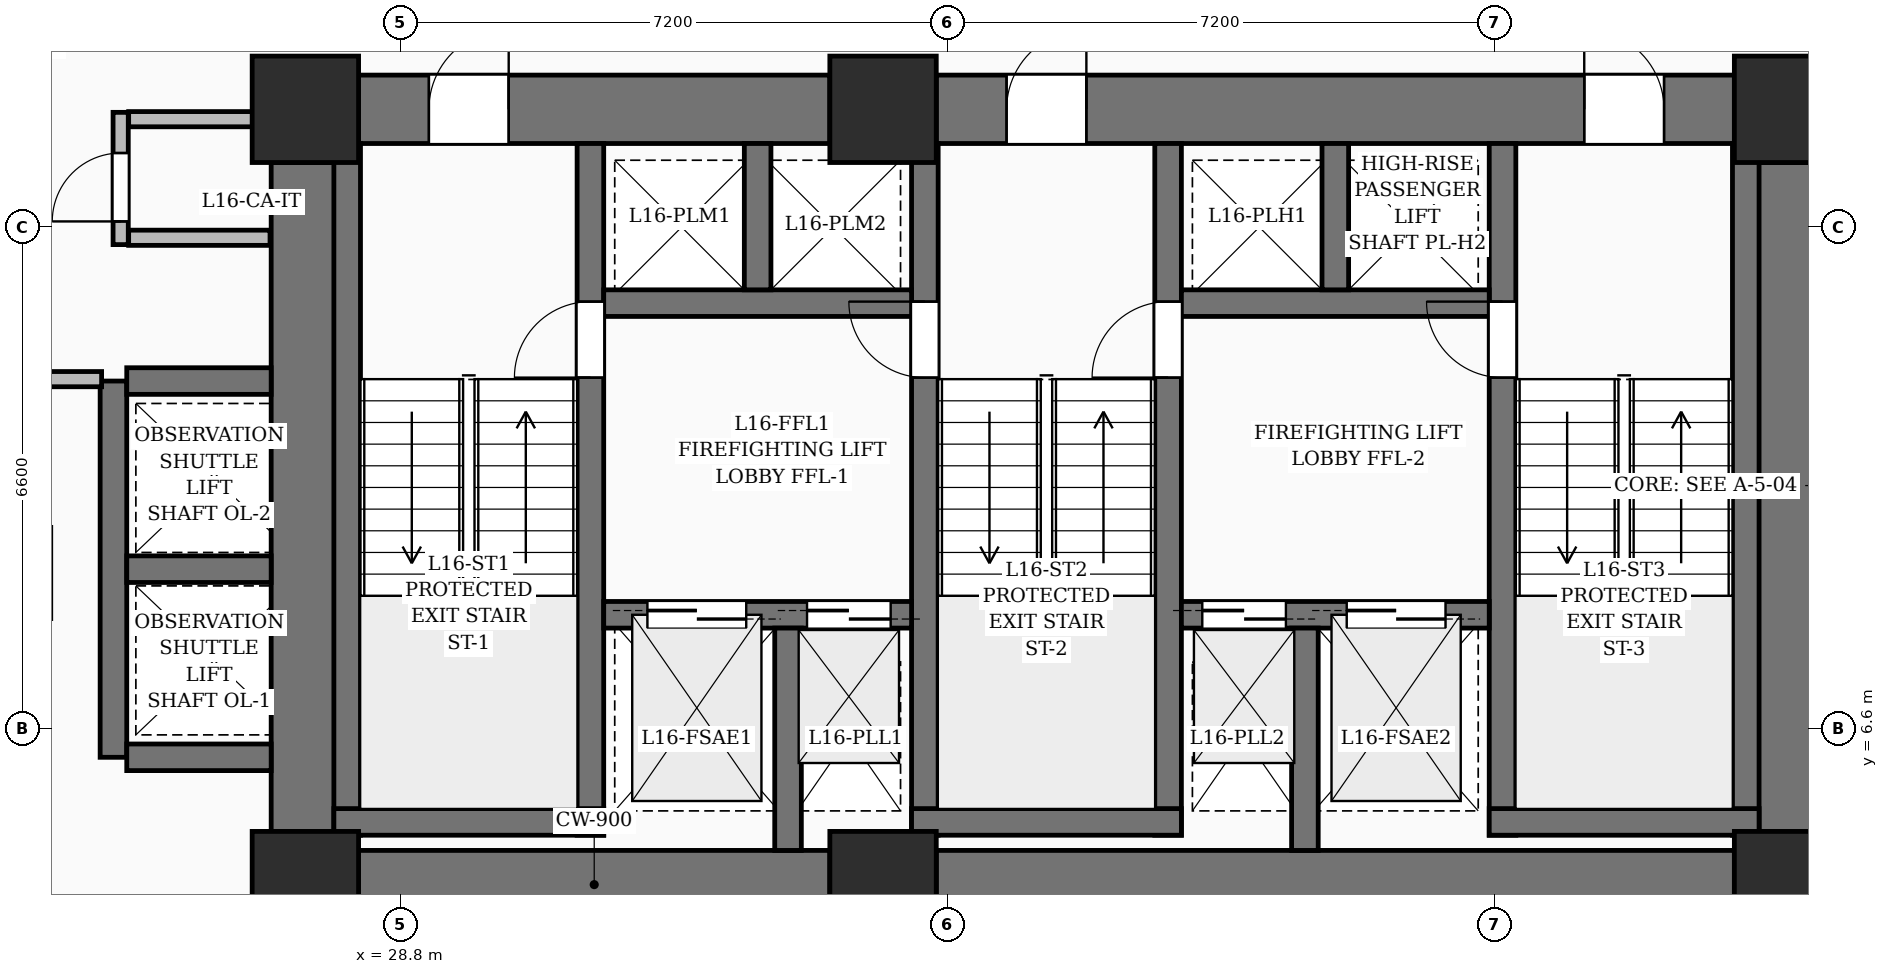
"""IFC4 building model, lengths in metres.
Left out: names, types, materials, properties, quantities, classifications, styles, units other than length and angle.
Written with IfcOpenShell. Run it as: python <this file> out.ifc"""

import sys

from ifc_helpers import new_model, si_unit, direction, frame, frame_2d, origin, origin_2d, place, context, subcontext, project, spatial, rectangle, extrude, element, fill, save


model = new_model("IFC4")
c1 = context("Model", 3, precision=1e-05, world=origin(), true_north=direction((0.0, 1.0)))
c2 = subcontext(c1, "Body", "Model", "MODEL_VIEW")
j1 = project(units=[si_unit("LENGTHUNIT", "METRE"), si_unit("PLANEANGLEUNIT", "RADIAN")], contexts=[c1])
p1 = place(None, origin())
s1 = spatial("IfcSite", under=j1, at=p1, CompositionType="ELEMENT")
p2 = place(p1, origin())
s2 = spatial("IfcBuilding", under=s1, at=p2, CompositionType="ELEMENT")
p3 = place(p2, frame((0.0, 0.0, 67.8)))
s3 = spatial("IfcBuildingStorey", under=s2, at=p3, CompositionType="ELEMENT", Elevation=67.8)
for number, where, z_axis, x_axis in (
    (1, (27.55, 4.55, 0.0), (0.0, 0.0, 1.0), (1.0, 0.0, 0.0)),
    (2, (35.15, 4.55, 0.0), (0.0, 0.0, 1.0), (1.0, 0.0, 0.0)),
    (3, (47.05, 4.55, 0.0), (0.0, 0.0, 1.0), (1.0, 0.0, 0.0)),
    (4, (27.55, 14.75, 0.0), (0.0, 0.0, 1.0), (1.0, 0.0, 0.0)),
    (5, (35.15, 14.75, 0.0), (0.0, 0.0, 1.0), (1.0, 0.0, 0.0)),
    (6, (47.05, 14.75, 0.0), (0.0, 0.0, 1.0), (1.0, 0.0, 0.0)),
):
    element("IfcColumn", number, at=place(p3, frame(where, z_axis=z_axis, x_axis=x_axis)), inside=s3, PredefinedType="COLUMN", context=c2, shape_type="SweptSolid", body=[
        extrude(rectangle(XDim=1.4, YDim=1.4, at=origin_2d()), origin(), (0.0, 0.0, 1.0), 3.6),
    ])
p4 = place(p3, frame((28.25, 4.55, 0.0), z_axis=(0.0, 0.0, 1.0), x_axis=(1.0, 0.0, 0.0)))
e7 = element("IfcWall", 7, at=p4, inside=s3, PredefinedType="SHEAR", context=c2, shape_type="SweptSolid", body=[
    extrude(rectangle(XDim=6.2, YDim=0.9, at=frame_2d((3.1, 0.0))), origin(), (0.0, 0.0, 1.0), 3.6),
])
p5 = place(p3, frame((35.85, 4.55, 0.0), z_axis=(0.0, 0.0, 1.0), x_axis=(1.0, 0.0, 0.0)))
e8 = element("IfcWall", 8, at=p5, inside=s3, PredefinedType="SHEAR", context=c2, shape_type="SweptSolid", body=[
    extrude(rectangle(XDim=10.5, YDim=0.9, at=frame_2d((5.25, 0.0))), origin(), (0.0, 0.0, 1.0), 3.6),
])
p6 = place(p3, frame((28.25, 14.75, 0.0), z_axis=(0.0, 0.0, 1.0), x_axis=(1.0, 0.0, 0.0)))
e9 = element("IfcWall", 9, at=p6, inside=s3, PredefinedType="SHEAR", context=c2, shape_type="SweptSolid", body=[
    extrude(rectangle(XDim=6.2, YDim=0.9, at=frame_2d((3.1, 0.0))), origin(), (0.0, 0.0, 1.0), 3.6),
])
p7 = place(p6, frame((0.925, 0.0, 0.0)))
e10 = element("IfcOpeningElement", 10, at=p7, cuts=e9, PredefinedType="OPENING", context=c2, shape_type="SweptSolid", body=[
    extrude(rectangle(XDim=1.05, YDim=2.15, at=frame_2d((0.525, 1.075))), frame((0.0, 0.46, 0.0), z_axis=(0.0, -1.0, 0.0), x_axis=(1.0, 0.0, 0.0)), (0.0, 0.0, 1.0), 0.92),
])
p8 = place(p3, frame((35.85, 14.75, 0.0), z_axis=(0.0, 0.0, 1.0), x_axis=(1.0, 0.0, 0.0)))
e11 = element("IfcWall", 11, at=p8, inside=s3, PredefinedType="SHEAR", context=c2, shape_type="SweptSolid", body=[
    extrude(rectangle(XDim=10.5, YDim=0.9, at=frame_2d((5.25, 0.0))), origin(), (0.0, 0.0, 1.0), 3.6),
])
p9 = place(p8, frame((0.925, 0.0, 0.0)))
e12 = element("IfcOpeningElement", 12, at=p9, cuts=e11, PredefinedType="OPENING", context=c2, shape_type="SweptSolid", body=[
    extrude(rectangle(XDim=1.05, YDim=2.15, at=frame_2d((0.525, 1.075))), frame((0.0, 0.46, 0.0), z_axis=(0.0, -1.0, 0.0), x_axis=(1.0, 0.0, 0.0)), (0.0, 0.0, 1.0), 0.92),
])
p10 = place(p8, frame((8.525, 0.0, 0.0)))
e13 = element("IfcOpeningElement", 13, at=p10, cuts=e11, PredefinedType="OPENING", context=c2, shape_type="SweptSolid", body=[
    extrude(rectangle(XDim=1.05, YDim=2.15, at=frame_2d((0.525, 1.075))), frame((0.0, 0.46, 0.0), z_axis=(0.0, -1.0, 0.0), x_axis=(1.0, 0.0, 0.0)), (0.0, 0.0, 1.0), 0.92),
])
for number, where, z_axis, x_axis in (
    (14, (27.55, 5.25, 0.0), (0.0, 0.0, 1.0), (0.0, 1.0, 0.0)),
    (15, (47.05, 5.25, 0.0), (0.0, 0.0, 1.0), (0.0, 1.0, 0.0)),
):
    element("IfcWall", number, at=place(p3, frame(where, z_axis=z_axis, x_axis=x_axis)), inside=s3, PredefinedType="SHEAR", context=c2, shape_type="SweptSolid", body=[
        extrude(rectangle(XDim=8.8, YDim=0.9, at=frame_2d((4.4, 0.0))), origin(), (0.0, 0.0, 1.0), 3.6),
    ])
p11 = place(p3, frame((28.1, 5.2, 0.0), z_axis=(0.0, 0.0, 1.0), x_axis=(0.0, 1.0, 0.0)))
e16 = element("IfcWall", 16, at=p11, inside=s3, PredefinedType="SOLIDWALL", context=c2, shape_type="SweptSolid", body=[
    extrude(rectangle(XDim=9.1, YDim=0.35, at=frame_2d((4.55, 0.0))), origin(), (0.0, 0.0, 1.0), 3.6),
])
p12 = place(p3, frame((31.3, 5.2, 0.0), z_axis=(0.0, 0.0, 1.0), x_axis=(0.0, 1.0, 0.0)))
e17 = element("IfcWall", 17, at=p12, inside=s3, PredefinedType="SOLIDWALL", context=c2, shape_type="SweptSolid", body=[
    extrude(rectangle(XDim=9.1, YDim=0.35, at=frame_2d((4.55, 0.0))), origin(), (0.0, 0.0, 1.0), 3.6),
])
p13 = place(p12, frame((6.02, 0.0, 0.0)))
e18 = element("IfcOpeningElement", 18, at=p13, cuts=e17, PredefinedType="OPENING", context=c2, shape_type="SweptSolid", body=[
    extrude(rectangle(XDim=1.0, YDim=2.15, at=frame_2d((0.5, 1.075))), frame((0.0, 0.185, 0.0), z_axis=(0.0, -1.0, 0.0), x_axis=(1.0, 0.0, 0.0)), (0.0, 0.0, 1.0), 0.37),
])
p14 = place(p3, frame((27.925, 5.375, 0.0), z_axis=(0.0, 0.0, 1.0), x_axis=(1.0, 0.0, 0.0)))
e19 = element("IfcWall", 19, at=p14, inside=s3, PredefinedType="SOLIDWALL", context=c2, shape_type="SweptSolid", body=[
    extrude(rectangle(XDim=3.55, YDim=0.35, at=frame_2d((1.775, 0.0))), origin(), (0.0, 0.0, 1.0), 3.6),
])
p15 = place(p3, frame((35.7, 5.2, 0.0), z_axis=(0.0, 0.0, 1.0), x_axis=(0.0, 1.0, 0.0)))
e20 = element("IfcWall", 20, at=p15, inside=s3, PredefinedType="SOLIDWALL", context=c2, shape_type="SweptSolid", body=[
    extrude(rectangle(XDim=9.1, YDim=0.35, at=frame_2d((4.55, 0.0))), origin(), (0.0, 0.0, 1.0), 3.6),
])
p16 = place(p15, frame((6.02, 0.0, 0.0)))
e21 = element("IfcOpeningElement", 21, at=p16, cuts=e20, PredefinedType="OPENING", context=c2, shape_type="SweptSolid", body=[
    extrude(rectangle(XDim=1.0, YDim=2.15, at=frame_2d((0.5, 1.075))), frame((0.0, 0.185, 0.0), z_axis=(0.0, -1.0, 0.0), x_axis=(1.0, 0.0, 0.0)), (0.0, 0.0, 1.0), 0.37),
])
p17 = place(p3, frame((38.9, 5.2, 0.0), z_axis=(0.0, 0.0, 1.0), x_axis=(0.0, 1.0, 0.0)))
e22 = element("IfcWall", 22, at=p17, inside=s3, PredefinedType="SOLIDWALL", context=c2, shape_type="SweptSolid", body=[
    extrude(rectangle(XDim=9.1, YDim=0.35, at=frame_2d((4.55, 0.0))), origin(), (0.0, 0.0, 1.0), 3.6),
])
p18 = place(p17, frame((6.02, 0.0, 0.0)))
e23 = element("IfcOpeningElement", 23, at=p18, cuts=e22, PredefinedType="OPENING", context=c2, shape_type="SweptSolid", body=[
    extrude(rectangle(XDim=1.0, YDim=2.15, at=frame_2d((0.5, 1.075))), frame((0.0, 0.185, 0.0), z_axis=(0.0, -1.0, 0.0), x_axis=(1.0, 0.0, 0.0)), (0.0, 0.0, 1.0), 0.37),
])
p19 = place(p3, frame((35.525, 5.375, 0.0), z_axis=(0.0, 0.0, 1.0), x_axis=(1.0, 0.0, 0.0)))
e24 = element("IfcWall", 24, at=p19, inside=s3, PredefinedType="SOLIDWALL", context=c2, shape_type="SweptSolid", body=[
    extrude(rectangle(XDim=3.55, YDim=0.35, at=frame_2d((1.775, 0.0))), origin(), (0.0, 0.0, 1.0), 3.6),
])
p20 = place(p3, frame((43.3, 5.2, 0.0), z_axis=(0.0, 0.0, 1.0), x_axis=(0.0, 1.0, 0.0)))
e25 = element("IfcWall", 25, at=p20, inside=s3, PredefinedType="SOLIDWALL", context=c2, shape_type="SweptSolid", body=[
    extrude(rectangle(XDim=9.1, YDim=0.35, at=frame_2d((4.55, 0.0))), origin(), (0.0, 0.0, 1.0), 3.6),
])
p21 = place(p20, frame((6.02, 0.0, 0.0)))
e26 = element("IfcOpeningElement", 26, at=p21, cuts=e25, PredefinedType="OPENING", context=c2, shape_type="SweptSolid", body=[
    extrude(rectangle(XDim=1.0, YDim=2.15, at=frame_2d((0.5, 1.075))), frame((0.0, 0.185, 0.0), z_axis=(0.0, -1.0, 0.0), x_axis=(1.0, 0.0, 0.0)), (0.0, 0.0, 1.0), 0.37),
])
p22 = place(p3, frame((46.5, 5.2, 0.0), z_axis=(0.0, 0.0, 1.0), x_axis=(0.0, 1.0, 0.0)))
e27 = element("IfcWall", 27, at=p22, inside=s3, PredefinedType="SOLIDWALL", context=c2, shape_type="SweptSolid", body=[
    extrude(rectangle(XDim=9.1, YDim=0.35, at=frame_2d((4.55, 0.0))), origin(), (0.0, 0.0, 1.0), 3.6),
])
p23 = place(p3, frame((43.125, 5.375, 0.0), z_axis=(0.0, 0.0, 1.0), x_axis=(1.0, 0.0, 0.0)))
e28 = element("IfcWall", 28, at=p23, inside=s3, PredefinedType="SOLIDWALL", context=c2, shape_type="SweptSolid", body=[
    extrude(rectangle(XDim=3.55, YDim=0.35, at=frame_2d((1.775, 0.0))), origin(), (0.0, 0.0, 1.0), 3.6),
])
p24 = place(p3, frame((31.475, 8.1, 0.0), z_axis=(0.0, 0.0, 1.0), x_axis=(1.0, 0.0, 0.0)))
e29 = element("IfcWall", 29, at=p24, inside=s3, PredefinedType="SOLIDWALL", context=c2, shape_type="SweptSolid", body=[
    extrude(rectangle(XDim=4.05, YDim=0.35, at=frame_2d((2.025, 0.0))), origin(), (0.0, 0.0, 1.0), 3.6),
])
p25 = place(p24, frame((0.575, 0.0, 0.0)))
e30 = element("IfcOpeningElement", 30, at=p25, cuts=e29, PredefinedType="OPENING", context=c2, shape_type="SweptSolid", body=[
    extrude(rectangle(XDim=1.3, YDim=2.25, at=frame_2d((0.65, 1.125))), frame((0.0, 0.185, 0.0), z_axis=(0.0, -1.0, 0.0), x_axis=(1.0, 0.0, 0.0)), (0.0, 0.0, 1.0), 0.37),
])
p26 = place(p24, frame((2.675, 0.0, 0.0)))
e31 = element("IfcOpeningElement", 31, at=p26, cuts=e29, PredefinedType="OPENING", context=c2, shape_type="SweptSolid", body=[
    extrude(rectangle(XDim=1.1, YDim=2.2, at=frame_2d((0.55, 1.1))), frame((0.0, 0.185, 0.0), z_axis=(0.0, -1.0, 0.0), x_axis=(1.0, 0.0, 0.0)), (0.0, 0.0, 1.0), 0.37),
])
p27 = place(p3, frame((39.075, 8.1, 0.0), z_axis=(0.0, 0.0, 1.0), x_axis=(1.0, 0.0, 0.0)))
e32 = element("IfcWall", 32, at=p27, inside=s3, PredefinedType="SOLIDWALL", context=c2, shape_type="SweptSolid", body=[
    extrude(rectangle(XDim=4.05, YDim=0.35, at=frame_2d((2.025, 0.0))), origin(), (0.0, 0.0, 1.0), 3.6),
])
p28 = place(p27, frame((2.175, 0.0, 0.0)))
e33 = element("IfcOpeningElement", 33, at=p28, cuts=e32, PredefinedType="OPENING", context=c2, shape_type="SweptSolid", body=[
    extrude(rectangle(XDim=1.3, YDim=2.25, at=frame_2d((0.65, 1.125))), frame((0.0, 0.185, 0.0), z_axis=(0.0, -1.0, 0.0), x_axis=(1.0, 0.0, 0.0)), (0.0, 0.0, 1.0), 0.37),
])
p29 = place(p27, frame((0.275, 0.0, 0.0)))
e34 = element("IfcOpeningElement", 34, at=p29, cuts=e32, PredefinedType="OPENING", context=c2, shape_type="SweptSolid", body=[
    extrude(rectangle(XDim=1.1, YDim=2.2, at=frame_2d((0.55, 1.1))), frame((0.0, 0.185, 0.0), z_axis=(0.0, -1.0, 0.0), x_axis=(1.0, 0.0, 0.0)), (0.0, 0.0, 1.0), 0.37),
])
for number, where, z_axis, x_axis in (
    (35, (33.9, 5.0, 0.0), (0.0, 0.0, 1.0), (0.0, 1.0, 0.0)),
    (36, (40.7, 5.0, 0.0), (0.0, 0.0, 1.0), (0.0, 1.0, 0.0)),
):
    element("IfcWall", number, at=place(p3, frame(where, z_axis=z_axis, x_axis=x_axis)), inside=s3, PredefinedType="SOLIDWALL", context=c2, shape_type="SweptSolid", body=[
        extrude(rectangle(XDim=2.925, YDim=0.35, at=frame_2d((1.462, 0.0))), origin(), (0.0, 0.0, 1.0), 3.6),
    ])
p30 = place(p3, frame((31.475, 12.2, 0.0), z_axis=(0.0, 0.0, 1.0), x_axis=(1.0, 0.0, 0.0)))
e37 = element("IfcWall", 37, at=p30, inside=s3, PredefinedType="SOLIDWALL", context=c2, shape_type="SweptSolid", body=[
    extrude(rectangle(XDim=4.05, YDim=0.35, at=frame_2d((2.025, 0.0))), origin(), (0.0, 0.0, 1.0), 3.6),
])
p31 = place(p3, frame((33.5, 12.375, 0.0), z_axis=(0.0, 0.0, 1.0), x_axis=(0.0, 1.0, 0.0)))
e38 = element("IfcWall", 38, at=p31, inside=s3, PredefinedType="SOLIDWALL", context=c2, shape_type="SweptSolid", body=[
    extrude(rectangle(XDim=1.925, YDim=0.35, at=frame_2d((0.962, 0.0))), origin(), (0.0, 0.0, 1.0), 3.6),
])
p32 = place(p3, frame((39.075, 12.2, 0.0), z_axis=(0.0, 0.0, 1.0), x_axis=(1.0, 0.0, 0.0)))
e39 = element("IfcWall", 39, at=p32, inside=s3, PredefinedType="SOLIDWALL", context=c2, shape_type="SweptSolid", body=[
    extrude(rectangle(XDim=4.05, YDim=0.35, at=frame_2d((2.025, 0.0))), origin(), (0.0, 0.0, 1.0), 3.6),
])
p33 = place(p3, frame((41.1, 12.375, 0.0), z_axis=(0.0, 0.0, 1.0), x_axis=(0.0, 1.0, 0.0)))
e40 = element("IfcWall", 40, at=p33, inside=s3, PredefinedType="SOLIDWALL", context=c2, shape_type="SweptSolid", body=[
    extrude(rectangle(XDim=1.925, YDim=0.35, at=frame_2d((0.962, 0.0))), origin(), (0.0, 0.0, 1.0), 3.6),
])
p34 = place(p3, frame((25.025, 6.225, 0.0), z_axis=(0.0, 0.0, 1.0), x_axis=(0.0, 1.0, 0.0)))
e41 = element("IfcWall", 41, at=p34, inside=s3, PredefinedType="SOLIDWALL", context=c2, shape_type="SweptSolid", body=[
    extrude(rectangle(XDim=4.95, YDim=0.35, at=frame_2d((2.475, 0.0))), origin(), (0.0, 0.0, 1.0), 3.6),
])
for number, where, z_axis, x_axis in (
    (42, (25.2, 6.225, 0.0), (0.0, 0.0, 1.0), (1.0, 0.0, 0.0)),
    (43, (25.2, 8.7, 0.0), (0.0, 0.0, 1.0), (1.0, 0.0, 0.0)),
    (44, (25.2, 11.175, 0.0), (0.0, 0.0, 1.0), (1.0, 0.0, 0.0)),
):
    element("IfcWall", number, at=place(p3, frame(where, z_axis=z_axis, x_axis=x_axis)), inside=s3, PredefinedType="SOLIDWALL", context=c2, shape_type="SweptSolid", body=[
        extrude(rectangle(XDim=1.9, YDim=0.35, at=frame_2d((0.95, 0.0))), origin(), (0.0, 0.0, 1.0), 3.6),
    ])
p35 = place(p3, frame((25.12, 12.97, 0.0), z_axis=(0.0, 0.0, 1.0), x_axis=(0.0, 1.0, 0.0)))
e45 = element("IfcWall", 45, at=p35, inside=s3, PredefinedType="PARTITIONING", context=c2, shape_type="SweptSolid", body=[
    extrude(rectangle(XDim=1.74, YDim=0.2, at=frame_2d((0.87, 0.0))), origin(), (0.0, 0.0, 1.0), 3.35),
])
p36 = place(p35, frame((0.305, 0.0, 0.0)))
e46 = element("IfcOpeningElement", 46, at=p36, cuts=e45, PredefinedType="OPENING", context=c2, shape_type="SweptSolid", body=[
    extrude(rectangle(XDim=0.9, YDim=2.1, at=frame_2d((0.45, 1.05))), frame((0.0, 0.11, 0.0), z_axis=(0.0, -1.0, 0.0), x_axis=(1.0, 0.0, 0.0)), (0.0, 0.0, 1.0), 0.22),
])
for number, where, z_axis, x_axis in (
    (47, (25.225, 14.62, 0.0), (0.0, 0.0, 1.0), (1.0, 0.0, 0.0)),
    (48, (25.225, 13.06, 0.0), (0.0, 0.0, 1.0), (1.0, 0.0, 0.0)),
):
    element("IfcWall", number, at=place(p3, frame(where, z_axis=z_axis, x_axis=x_axis)), inside=s3, PredefinedType="PARTITIONING", context=c2, shape_type="SweptSolid", body=[
        extrude(rectangle(XDim=1.86, YDim=0.2, at=frame_2d((0.93, 0.0))), origin(), (0.0, 0.0, 1.0), 3.35),
    ])
p37 = place(p3, frame((21.45, 11.2, 0.0), z_axis=(0.0, 0.0, 1.0), x_axis=(1.0, 0.0, 0.0)))
e49 = element("IfcWall", 49, at=p37, inside=s3, PredefinedType="PARTITIONING", context=c2, shape_type="SweptSolid", body=[
    extrude(rectangle(XDim=3.419, YDim=0.2, at=frame_2d((1.709, 0.0))), origin(), (0.0, 0.0, 1.0), 2.787),
])
p38 = place(p7, origin())
e50 = element("IfcDoor", 50, at=p38, inside=s3, OperationType="SINGLE_SWING_RIGHT", PredefinedType="DOOR", context=c2, shape_type="SweptSolid", body=[
    extrude(rectangle(XDim=1.05, YDim=2.15, at=frame_2d((0.525, 1.075))), frame((0.0, 0.025, 0.0), z_axis=(0.0, -1.0, 0.0), x_axis=(1.0, 0.0, 0.0)), (0.0, 0.0, 1.0), 0.05),
])
fill(e10, e50)
p39 = place(p9, origin())
e51 = element("IfcDoor", 51, at=p39, inside=s3, OperationType="SINGLE_SWING_RIGHT", PredefinedType="DOOR", context=c2, shape_type="SweptSolid", body=[
    extrude(rectangle(XDim=1.05, YDim=2.15, at=frame_2d((0.525, 1.075))), frame((0.0, 0.025, 0.0), z_axis=(0.0, -1.0, 0.0), x_axis=(1.0, 0.0, 0.0)), (0.0, 0.0, 1.0), 0.05),
])
fill(e12, e51)
p40 = place(p10, origin())
e52 = element("IfcDoor", 52, at=p40, inside=s3, OperationType="SINGLE_SWING_LEFT", PredefinedType="DOOR", context=c2, shape_type="SweptSolid", body=[
    extrude(rectangle(XDim=1.05, YDim=2.15, at=frame_2d((0.525, 1.075))), frame((0.0, 0.025, 0.0), z_axis=(0.0, -1.0, 0.0), x_axis=(1.0, 0.0, 0.0)), (0.0, 0.0, 1.0), 0.05),
])
fill(e13, e52)
p41 = place(p13, origin())
e53 = element("IfcDoor", 53, at=p41, inside=s3, OperationType="SINGLE_SWING_LEFT", PredefinedType="DOOR", context=c2, shape_type="SweptSolid", body=[
    extrude(rectangle(XDim=1.0, YDim=2.15, at=frame_2d((0.5, 1.075))), frame((0.0, 0.025, 0.0), z_axis=(0.0, -1.0, 0.0), x_axis=(1.0, 0.0, 0.0)), (0.0, 0.0, 1.0), 0.05),
])
fill(e18, e53)
p42 = place(p16, origin())
e54 = element("IfcDoor", 54, at=p42, inside=s3, OperationType="SINGLE_SWING_RIGHT", PredefinedType="DOOR", context=c2, shape_type="SweptSolid", body=[
    extrude(rectangle(XDim=1.0, YDim=2.15, at=frame_2d((0.5, 1.075))), frame((0.0, 0.025, 0.0), z_axis=(0.0, -1.0, 0.0), x_axis=(1.0, 0.0, 0.0)), (0.0, 0.0, 1.0), 0.05),
])
fill(e21, e54)
p43 = place(p18, origin())
e55 = element("IfcDoor", 55, at=p43, inside=s3, OperationType="SINGLE_SWING_LEFT", PredefinedType="DOOR", context=c2, shape_type="SweptSolid", body=[
    extrude(rectangle(XDim=1.0, YDim=2.15, at=frame_2d((0.5, 1.075))), frame((0.0, 0.025, 0.0), z_axis=(0.0, -1.0, 0.0), x_axis=(1.0, 0.0, 0.0)), (0.0, 0.0, 1.0), 0.05),
])
fill(e23, e55)
p44 = place(p21, origin())
e56 = element("IfcDoor", 56, at=p44, inside=s3, OperationType="SINGLE_SWING_RIGHT", PredefinedType="DOOR", context=c2, shape_type="SweptSolid", body=[
    extrude(rectangle(XDim=1.0, YDim=2.15, at=frame_2d((0.5, 1.075))), frame((0.0, 0.025, 0.0), z_axis=(0.0, -1.0, 0.0), x_axis=(1.0, 0.0, 0.0)), (0.0, 0.0, 1.0), 0.05),
])
fill(e26, e56)
p45 = place(p25, origin())
e57 = element("IfcDoor", 57, at=p45, inside=s3, OperationType="DOUBLE_DOOR_SLIDING", PredefinedType="DOOR", context=c2, shape_type="SweptSolid", body=[
    extrude(rectangle(XDim=1.3, YDim=2.25, at=frame_2d((0.65, 1.125))), frame((0.0, 0.025, 0.0), z_axis=(0.0, -1.0, 0.0), x_axis=(1.0, 0.0, 0.0)), (0.0, 0.0, 1.0), 0.05),
])
fill(e30, e57)
p46 = place(p28, origin())
e58 = element("IfcDoor", 58, at=p46, inside=s3, OperationType="DOUBLE_DOOR_SLIDING", PredefinedType="DOOR", context=c2, shape_type="SweptSolid", body=[
    extrude(rectangle(XDim=1.3, YDim=2.25, at=frame_2d((0.65, 1.125))), frame((0.0, 0.025, 0.0), z_axis=(0.0, -1.0, 0.0), x_axis=(1.0, 0.0, 0.0)), (0.0, 0.0, 1.0), 0.05),
])
fill(e33, e58)
p47 = place(p26, origin())
e59 = element("IfcDoor", 59, at=p47, inside=s3, OperationType="DOUBLE_DOOR_SLIDING", PredefinedType="DOOR", context=c2, shape_type="SweptSolid", body=[
    extrude(rectangle(XDim=1.1, YDim=2.2, at=frame_2d((0.55, 1.1))), frame((0.0, 0.025, 0.0), z_axis=(0.0, -1.0, 0.0), x_axis=(1.0, 0.0, 0.0)), (0.0, 0.0, 1.0), 0.05),
])
fill(e31, e59)
p48 = place(p29, origin())
e60 = element("IfcDoor", 60, at=p48, inside=s3, OperationType="DOUBLE_DOOR_SLIDING", PredefinedType="DOOR", context=c2, shape_type="SweptSolid", body=[
    extrude(rectangle(XDim=1.1, YDim=2.2, at=frame_2d((0.55, 1.1))), frame((0.0, 0.025, 0.0), z_axis=(0.0, -1.0, 0.0), x_axis=(1.0, 0.0, 0.0)), (0.0, 0.0, 1.0), 0.05),
])
fill(e34, e60)
p49 = place(p36, origin())
e61 = element("IfcDoor", 61, at=p49, inside=s3, OperationType="SINGLE_SWING_LEFT", PredefinedType="DOOR", context=c2, shape_type="SweptSolid", body=[
    extrude(rectangle(XDim=0.9, YDim=2.1, at=frame_2d((0.45, 1.05))), frame((0.0, 0.025, 0.0), z_axis=(0.0, -1.0, 0.0), x_axis=(1.0, 0.0, 0.0)), (0.0, 0.0, 1.0), 0.05),
])
fill(e46, e61)
save(model, sys.argv[1])
